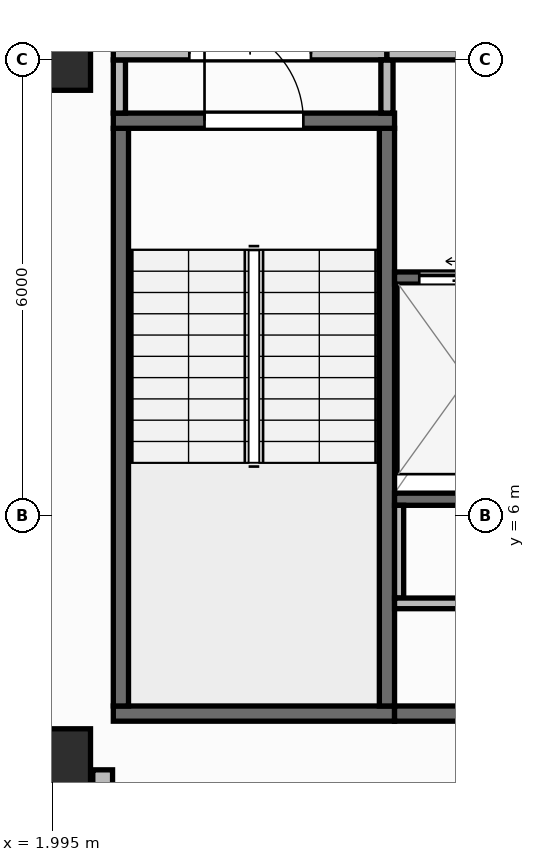
"""IFC4 building model, lengths in metres.
Left out: names, types, materials, properties, quantities, classifications, styles, units other than length and angle.
Written with IfcOpenShell. Run it as: python <this file> out.ifc"""

import sys

from ifc_helpers import new_model, si_unit, direction, frame, frame_2d, origin, origin_2d, place, context, subcontext, project, spatial, rectangle, extrude, element, fill, save


model = new_model("IFC4")
c1 = context("Model", 3, precision=1e-05, world=origin(), true_north=direction((0.0, 1.0)))
c2 = subcontext(c1, "Body", "Model", "MODEL_VIEW")
j1 = project(units=[si_unit("LENGTHUNIT", "METRE"), si_unit("PLANEANGLEUNIT", "RADIAN")], contexts=[c1])
p1 = place(None, origin())
s1 = spatial("IfcSite", under=j1, at=p1, CompositionType="ELEMENT")
p2 = place(p1, origin())
s2 = spatial("IfcBuilding", under=s1, at=p2, CompositionType="ELEMENT")
p3 = place(p2, frame((0.0, 0.0, 252.6)))
s3 = spatial("IfcBuildingStorey", under=s2, at=p3, CompositionType="ELEMENT", Elevation=252.6)
for number, where, z_axis, x_axis in (
    (1, (2.1, 2.8, 0.0), (0.0, 0.0, 1.0), (1.0, 0.0, 0.0)),
    (2, (2.1, 12.0, 0.0), (0.0, 0.0, 1.0), (1.0, 0.0, 0.0)),
):
    element("IfcColumn", number, at=place(p3, frame(where, z_axis=z_axis, x_axis=x_axis)), inside=s3, PredefinedType="COLUMN", context=c2, shape_type="SweptSolid", body=[
        extrude(rectangle(XDim=0.8, YDim=0.8, at=origin_2d()), origin(), (0.0, 0.0, 1.0), 3.95),
    ])
p4 = place(p3, frame((2.66, 2.66, 0.0), z_axis=(0.0, 0.0, 1.0), x_axis=(0.0, -1.0, 0.0)))
e3 = element("IfcWall", 3, at=p4, inside=s3, PredefinedType="STANDARD", context=c2, shape_type="SweptSolid", body=[
    extrude(rectangle(XDim=2.486, YDim=0.26, at=frame_2d((1.243, 0.0))), origin(), (0.0, 0.0, 1.0), 3.71),
])
p5 = place(p3, frame((2.66, 0.174, 0.0), z_axis=(0.0, 0.0, 1.0), x_axis=(0.996611813627, 0.082248969229, 0.0)))
e4 = element("IfcWall", 4, at=p5, inside=s3, PredefinedType="STANDARD", context=c2, shape_type="SweptSolid", body=[
    extrude(rectangle(XDim=41.019, YDim=0.26, at=frame_2d((20.51, 0.0))), origin(), (0.0, 0.0, 1.0), 3.71),
])
p6 = place(p5, frame((19.31, 0.0, 0.9)))
e5 = element("IfcOpeningElement", 5, at=p6, cuts=e4, PredefinedType="OPENING", context=c2, shape_type="SweptSolid", body=[
    extrude(rectangle(XDim=2.4, YDim=1.65, at=frame_2d((1.2, 0.825))), frame((0.0, 0.14, 0.0), z_axis=(0.0, -1.0, 0.0), x_axis=(1.0, 0.0, 0.0)), (0.0, 0.0, 1.0), 0.28),
])
p7 = place(p3, frame((2.8, 3.4, 0.0), z_axis=(0.0, 0.0, 1.0), x_axis=(1.0, 0.0, 0.0)))
e6 = element("IfcWall", 6, at=p7, inside=s3, PredefinedType="SHEAR", context=c2, shape_type="SweptSolid", body=[
    extrude(rectangle(XDim=3.7, YDim=0.2, at=frame_2d((1.85, 0.0))), origin(), (0.0, 0.0, 1.0), 3.71),
])
for number, where, z_axis, x_axis in (
    (7, (2.9, 3.5, 0.0), (0.0, 0.0, 1.0), (0.0, 1.0, 0.0)),
    (8, (6.4, 3.5, 0.0), (0.0, 0.0, 1.0), (0.0, 1.0, 0.0)),
):
    element("IfcWall", number, at=place(p3, frame(where, z_axis=z_axis, x_axis=x_axis)), inside=s3, PredefinedType="SHEAR", context=c2, shape_type="SweptSolid", body=[
        extrude(rectangle(XDim=7.6, YDim=0.2, at=frame_2d((3.8, 0.0))), origin(), (0.0, 0.0, 1.0), 3.71),
    ])
p8 = place(p3, frame((2.8, 11.2, 0.0), z_axis=(0.0, 0.0, 1.0), x_axis=(1.0, 0.0, 0.0)))
e9 = element("IfcWall", 9, at=p8, inside=s3, PredefinedType="SHEAR", context=c2, shape_type="SweptSolid", body=[
    extrude(rectangle(XDim=3.7, YDim=0.2, at=frame_2d((1.85, 0.0))), origin(), (0.0, 0.0, 1.0), 3.71),
])
p9 = place(p8, frame((1.2, 0.0, 0.0)))
e10 = element("IfcOpeningElement", 10, at=p9, cuts=e9, PredefinedType="OPENING", context=c2, shape_type="SweptSolid", body=[
    extrude(rectangle(XDim=1.3, YDim=2.15, at=frame_2d((0.65, 1.075))), frame((0.0, 0.11, 0.0), z_axis=(0.0, -1.0, 0.0), x_axis=(1.0, 0.0, 0.0)), (0.0, 0.0, 1.0), 0.22),
])
p10 = place(p3, frame((6.5, 3.4, 0.0), z_axis=(0.0, 0.0, 1.0), x_axis=(1.0, 0.0, 0.0)))
e11 = element("IfcWall", 11, at=p10, inside=s3, PredefinedType="SHEAR", context=c2, shape_type="SweptSolid", body=[
    extrude(rectangle(XDim=13.7, YDim=0.2, at=frame_2d((6.85, 0.0))), origin(), (0.0, 0.0, 1.0), 3.71),
])
p11 = place(p3, frame((6.5, 6.22, 0.0), z_axis=(0.0, 0.0, 1.0), x_axis=(1.0, 0.0, 0.0)))
e12 = element("IfcWall", 12, at=p11, inside=s3, PredefinedType="SHEAR", context=c2, shape_type="SweptSolid", body=[
    extrude(rectangle(XDim=12.11, YDim=0.16, at=frame_2d((6.055, 0.0))), origin(), (0.0, 0.0, 1.0), 3.71),
])
p12 = place(p3, frame((6.5, 9.13, 0.0), z_axis=(0.0, 0.0, 1.0), x_axis=(1.0, 0.0, 0.0)))
e13 = element("IfcWall", 13, at=p12, inside=s3, PredefinedType="SHEAR", context=c2, shape_type="SweptSolid", body=[
    extrude(rectangle(XDim=1.975, YDim=0.16, at=frame_2d((0.988, 0.0))), origin(), (0.0, 0.0, 1.0), 3.71),
])
p13 = place(p12, frame((0.325, 0.0, 0.0)))
e14 = element("IfcOpeningElement", 14, at=p13, cuts=e13, PredefinedType="OPENING", context=c2, shape_type="SweptSolid", body=[
    extrude(rectangle(XDim=1.25, YDim=2.15, at=frame_2d((0.625, 1.075))), frame((0.0, 0.09, 0.0), z_axis=(0.0, -1.0, 0.0), x_axis=(1.0, 0.0, 0.0)), (0.0, 0.0, 1.0), 0.18),
])
p14 = place(p3, frame((6.56, 4.92, 0.0), z_axis=(0.0, 0.0, 1.0), x_axis=(0.0, 1.0, 0.0)))
e15 = element("IfcWall", 15, at=p14, inside=s3, PredefinedType="PARTITIONING", context=c2, shape_type="SweptSolid", body=[
    extrude(rectangle(XDim=1.22, YDim=0.12, at=frame_2d((0.61, 0.0))), origin(), (0.0, 0.0, 1.0), 3.71),
])
p15 = place(p3, frame((6.5, 4.85, 0.0), z_axis=(0.0, 0.0, 1.0), x_axis=(1.0, 0.0, 0.0)))
e16 = element("IfcWall", 16, at=p15, inside=s3, PredefinedType="PARTITIONING", context=c2, shape_type="SweptSolid", body=[
    extrude(rectangle(XDim=12.1, YDim=0.14, at=frame_2d((6.05, 0.0))), origin(), (0.0, 0.0, 1.0), 3.71),
])
p16 = place(p15, frame((5.5, 0.0, 0.0)))
e17 = element("IfcOpeningElement", 17, at=p16, cuts=e16, PredefinedType="OPENING", context=c2, shape_type="SweptSolid", body=[
    extrude(rectangle(XDim=1.1, YDim=2.1, at=frame_2d((0.55, 1.05))), frame((0.0, 0.08, 0.0), z_axis=(0.0, -1.0, 0.0), x_axis=(1.0, 0.0, 0.0)), (0.0, 0.0, 1.0), 0.16),
])
p17 = place(p3, frame((2.88, 11.3, 0.0), z_axis=(0.0, 0.0, 1.0), x_axis=(0.0, 1.0, 0.0)))
e18 = element("IfcWall", 18, at=p17, inside=s3, PredefinedType="PARTITIONING", context=c2, shape_type="SweptSolid", body=[
    extrude(rectangle(XDim=0.7, YDim=0.16, at=frame_2d((0.35, 0.0))), origin(), (0.0, 0.0, 1.0), 3.71),
])
p18 = place(p3, frame((2.8, 12.08, 0.0), z_axis=(0.0, 0.0, 1.0), x_axis=(1.0, 0.0, 0.0)))
e19 = element("IfcWall", 19, at=p18, inside=s3, PredefinedType="PARTITIONING", context=c2, shape_type="SweptSolid", body=[
    extrude(rectangle(XDim=3.6, YDim=0.16, at=frame_2d((1.8, 0.0))), origin(), (0.0, 0.0, 1.0), 3.157),
])
p19 = place(p18, frame((1.0, 0.0, 0.0)))
e20 = element("IfcOpeningElement", 20, at=p19, cuts=e19, PredefinedType="OPENING", context=c2, shape_type="SweptSolid", body=[
    extrude(rectangle(XDim=1.6, YDim=2.05, at=frame_2d((0.8, 1.025))), frame((0.0, 0.09, 0.0), z_axis=(0.0, -1.0, 0.0), x_axis=(1.0, 0.0, 0.0)), (0.0, 0.0, 1.0), 0.18),
])
p20 = place(p3, frame((6.4, 11.3, 0.0), z_axis=(0.0, 0.0, 1.0), x_axis=(0.0, 1.0, 0.0)))
e21 = element("IfcWall", 21, at=p20, inside=s3, PredefinedType="PARTITIONING", context=c2, shape_type="SweptSolid", body=[
    extrude(rectangle(XDim=0.7, YDim=0.16, at=frame_2d((0.35, 0.0))), origin(), (0.0, 0.0, 1.0), 3.71),
])
p21 = place(p3, frame((6.4, 12.08, 0.0), z_axis=(0.0, 0.0, 1.0), x_axis=(1.0, 0.0, 0.0)))
e22 = element("IfcWall", 22, at=p21, inside=s3, PredefinedType="PARTITIONING", context=c2, shape_type="SweptSolid", body=[
    extrude(rectangle(XDim=6.18, YDim=0.16, at=frame_2d((3.09, 0.0))), origin(), (0.0, 0.0, 1.0), 3.157),
])
p22 = place(p21, frame((2.29, 0.0, 0.0)))
e23 = element("IfcOpeningElement", 23, at=p22, cuts=e22, PredefinedType="OPENING", context=c2, shape_type="SweptSolid", body=[
    extrude(rectangle(XDim=1.6, YDim=2.05, at=frame_2d((0.8, 1.025))), frame((0.0, 0.09, 0.0), z_axis=(0.0, -1.0, 0.0), x_axis=(1.0, 0.0, 0.0)), (0.0, 0.0, 1.0), 0.18),
])
p23 = place(p9, origin())
e24 = element("IfcDoor", 24, at=p23, inside=s3, OperationType="SINGLE_SWING_LEFT", PredefinedType="DOOR", context=c2, shape_type="SweptSolid", body=[
    extrude(rectangle(XDim=1.3, YDim=2.15, at=frame_2d((0.65, 1.075))), frame((0.0, 0.025, 0.0), z_axis=(0.0, -1.0, 0.0), x_axis=(1.0, 0.0, 0.0)), (0.0, 0.0, 1.0), 0.05),
])
fill(e10, e24)
p24 = place(p13, origin())
e25 = element("IfcDoor", 25, at=p24, inside=s3, OperationType="SLIDING_TO_LEFT", PredefinedType="DOOR", context=c2, shape_type="SweptSolid", body=[
    extrude(rectangle(XDim=1.25, YDim=2.15, at=frame_2d((0.625, 1.075))), frame((0.0, 0.025, 0.0), z_axis=(0.0, -1.0, 0.0), x_axis=(1.0, 0.0, 0.0)), (0.0, 0.0, 1.0), 0.05),
])
fill(e14, e25)
p25 = place(p19, origin())
e26 = element("IfcDoor", 26, at=p25, inside=s3, OperationType="DOUBLE_DOOR_SINGLE_SWING", PredefinedType="DOOR", context=c2, shape_type="SweptSolid", body=[
    extrude(rectangle(XDim=1.6, YDim=2.05, at=frame_2d((0.8, 1.025))), frame((0.0, 0.025, 0.0), z_axis=(0.0, -1.0, 0.0), x_axis=(1.0, 0.0, 0.0)), (0.0, 0.0, 1.0), 0.05),
])
fill(e20, e26)
save(model, sys.argv[1])
